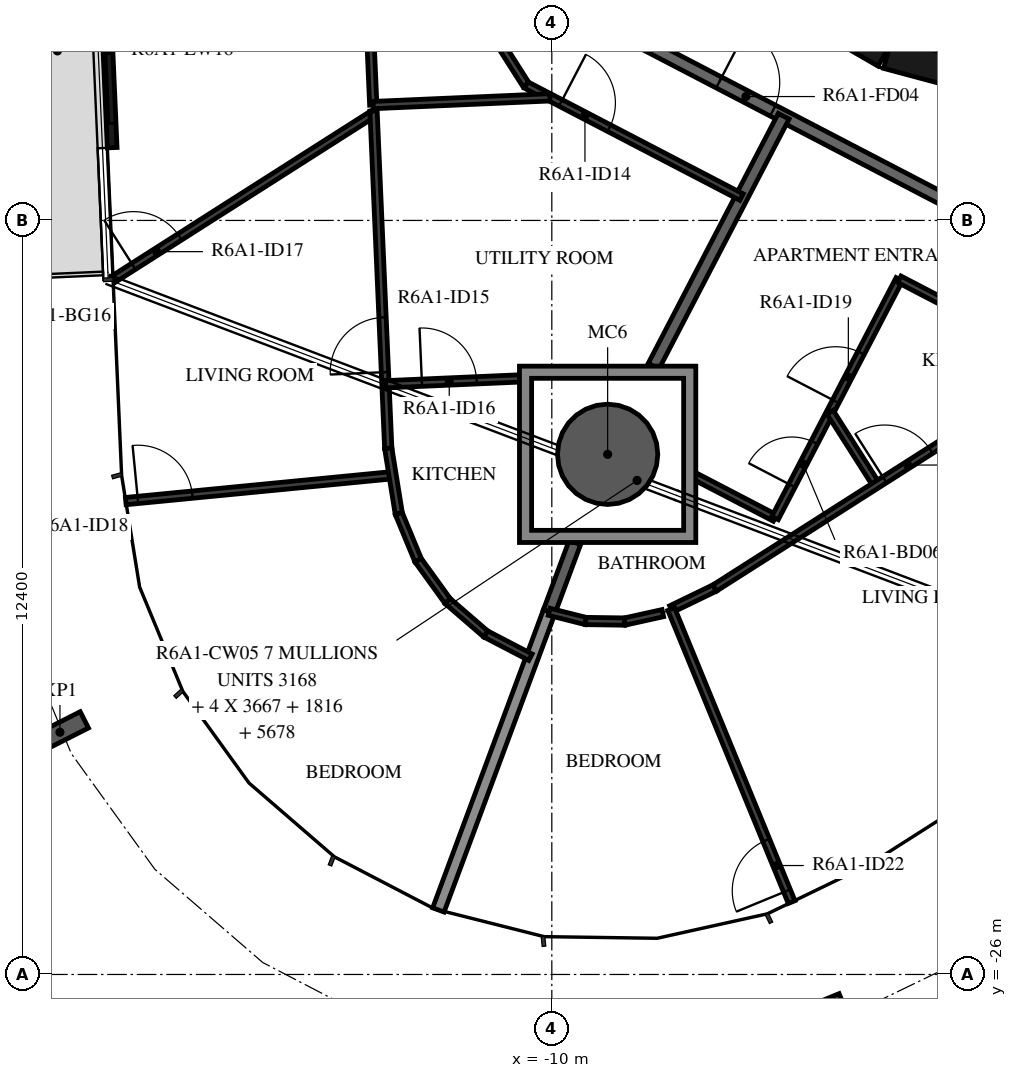
"""IFC4 building model, lengths in metres.
Left out: names, types, materials, properties, quantities, classifications, styles, units other than length and angle.
Written with IfcOpenShell. Run it as: python <this file> out.ifc"""

import sys

from ifc_helpers import new_model, si_unit, direction, frame, frame_2d, origin, origin_2d, place, context, subcontext, project, spatial, polyline, rectangle, hollow_circle, i_section, outline, extrude, element, fill, save


model = new_model("IFC4")
c1 = context("Model", 3, precision=1e-05, world=origin(), true_north=direction((0.0, 1.0)))
c2 = subcontext(c1, "Body", "Model", "MODEL_VIEW")
j1 = project(units=[si_unit("LENGTHUNIT", "METRE"), si_unit("PLANEANGLEUNIT", "RADIAN")], contexts=[c1])
p1 = place(None, origin())
s1 = spatial("IfcSite", under=j1, at=p1, CompositionType="ELEMENT")
p2 = place(p1, origin())
s2 = spatial("IfcBuilding", under=s1, at=p2, CompositionType="ELEMENT")
p3 = place(p2, frame((0.0, 0.0, 230.2)))
s3 = spatial("IfcBuildingStorey", under=s2, at=p3, CompositionType="ELEMENT", Elevation=230.2)
p4 = place(p3, frame((-9.082, -17.446, -0.38), z_axis=(0.0, 0.0, 1.0), x_axis=(1.0, 0.0, 0.0)))
e1 = element("IfcColumn", 1, at=p4, inside=s3, PredefinedType="COLUMN", context=c2, shape_type="SweptSolid", body=[
    extrude(hollow_circle(Radius=0.825, WallThickness=0.04, at=origin_2d()), origin(), (0.0, 0.0, 1.0), 3.5),
])
for number, where, z_axis, x_axis in (
    (2, (-18.089, -22.016, -0.38), (0.0, 0.0, 1.0), (-0.452, 0.892, 0.0)),
    (3, (-5.243, -26.789, -0.38), (0.0, 0.0, 1.0), (-0.925, -0.38, 0.0)),
):
    element("IfcColumn", number, at=place(p3, frame(where, z_axis=z_axis, x_axis=x_axis)), inside=s3, PredefinedType="COLUMN", context=c2, shape_type="SweptSolid", body=[
        extrude(i_section(OverallWidth=0.3, OverallDepth=0.9, WebThickness=0.019, FlangeThickness=0.035, FilletRadius=0.03, at=origin_2d()), origin(), (0.0, 0.0, 1.0), 3.5),
    ])
p5 = place(p3, frame((-17.369, -9.207, 0.0), z_axis=(0.0, 0.0, 1.0), x_axis=(0.043639181999, -0.999047357133, 0.0)))
e4 = element("IfcWall", 4, at=p5, inside=s3, PredefinedType="STANDARD", context=c2, shape_type="SweptSolid", body=[
    extrude(rectangle(XDim=3.2, YDim=0.16, at=frame_2d((1.6, 0.0))), origin(), (0.0, 0.0, 1.0), 3.12),
])
p6 = place(p5, frame((0.4, 0.0, 0.0)))
e5 = element("IfcOpeningElement", 5, at=p6, cuts=e4, PredefinedType="OPENING", context=c2, shape_type="SweptSolid", body=[
    extrude(rectangle(XDim=2.4, YDim=2.4, at=frame_2d((1.2, 1.2))), frame((0.0, 0.09, 0.0), z_axis=(0.0, -1.0, 0.0), x_axis=(1.0, 0.0, 0.0)), (0.0, 0.0, 1.0), 0.18),
])
for number, where, z_axis, x_axis in (
    (6, (-7.137, -9.329, 0.0), (0.0, 0.0, 1.0), (0.866, -0.5, 0.0)),
    (7, (-4.479, -10.858, 0.0), (0.0, 0.0, 1.0), (0.966, -0.259, 0.0)),
):
    element("IfcWall", number, at=place(p3, frame(where, z_axis=z_axis, x_axis=x_axis)), inside=s3, PredefinedType="SHEAR", context=c2, shape_type="SweptSolid", body=[
        extrude(rectangle(XDim=3.033, YDim=0.5, at=frame_2d((1.516, 0.0))), origin(), (0.0, 0.0, 1.0), 3.12),
    ])
p7 = place(p3, frame((-9.372, -10.228, 0.0), z_axis=(0.0, 0.0, 1.0), x_axis=(0.887005184532, -0.461759464021, 0.0)))
e8 = element("IfcWall", 8, at=p7, inside=s3, PredefinedType="STANDARD", context=c2, shape_type="SweptSolid", body=[
    extrude(rectangle(XDim=7.181, YDim=0.2, at=frame_2d((3.591, 0.0))), origin(), (0.0, 0.0, 1.0), 3.12),
])
p8 = place(p7, frame((2.391, 0.0, 0.0)))
e9 = element("IfcOpeningElement", 9, at=p8, cuts=e8, PredefinedType="OPENING", context=c2, shape_type="SweptSolid", body=[
    extrude(rectangle(XDim=1.0, YDim=2.1, at=frame_2d((0.5, 1.05))), frame((0.0, 0.11, 0.0), z_axis=(0.0, -1.0, 0.0), x_axis=(1.0, 0.0, 0.0)), (0.0, 0.0, 1.0), 0.22),
])
p9 = place(p3, frame((-8.326, -15.996, 0.0), z_axis=(0.0, 0.0, 1.0), x_axis=(0.461739255077, 0.887015704664, 0.0)))
e10 = element("IfcWall", 10, at=p9, inside=s3, PredefinedType="STANDARD", context=c2, shape_type="SweptSolid", body=[
    extrude(rectangle(XDim=4.633, YDim=0.2, at=frame_2d((2.317, 0.0))), origin(), (0.0, 0.0, 1.0), 3.12),
])
p10 = place(p3, frame((-11.865, -24.939, 0.0), z_axis=(0.0, 0.0, 1.0), x_axis=(0.348236919929, 0.937406554062, 0.0)))
e11 = element("IfcWall", 11, at=p10, inside=s3, PredefinedType="STANDARD", context=c2, shape_type="SweptSolid", body=[
    extrude(rectangle(XDim=5.231, YDim=0.2, at=frame_2d((2.615, 0.0))), origin(), (0.0, 0.0, 1.0), 2.73),
])
p11 = place(p3, frame((-10.044, -20.036, 0.0), z_axis=(0.0, 0.0, 1.0), x_axis=(0.348282344491, 0.937389678051, 0.0)))
e12 = element("IfcWall", 12, at=p11, inside=s3, PredefinedType="STANDARD", context=c2, shape_type="SweptSolid", body=[
    extrude(rectangle(XDim=1.216, YDim=0.2, at=frame_2d((0.608, 0.0))), origin(), (0.0, 0.0, 1.0), 3.12),
])
p12 = place(p3, frame((-13.137, -7.111, 0.0), z_axis=(0.0, 0.0, 1.0), x_axis=(0.537300549444, -0.843390846267, 0.0)))
e13 = element("IfcWall", 13, at=p12, inside=s3, PredefinedType="PARTITIONING", context=c2, shape_type="SweptSolid", body=[
    extrude(rectangle(XDim=5.054, YDim=0.12, at=frame_2d((2.527, 0.0))), origin(), (0.0, 0.0, 1.0), 3.12),
])
p13 = place(p12, frame((1.5, 0.0, 0.0)))
e14 = element("IfcOpeningElement", 14, at=p13, cuts=e13, PredefinedType="OPENING", context=c2, shape_type="SweptSolid", body=[
    extrude(rectangle(XDim=0.8, YDim=2.1, at=frame_2d((0.4, 1.05))), frame((0.0, 0.07, 0.0), z_axis=(0.0, -1.0, 0.0), x_axis=(1.0, 0.0, 0.0)), (0.0, 0.0, 1.0), 0.14),
])
p14 = place(p3, frame((-10.421, -11.373, 0.0), z_axis=(0.0, 0.0, 1.0), x_axis=(0.887006451745, -0.461757029792, 0.0)))
e15 = element("IfcWall", 15, at=p14, inside=s3, PredefinedType="PARTITIONING", context=c2, shape_type="SweptSolid", body=[
    extrude(rectangle(XDim=3.992, YDim=0.12, at=frame_2d((1.996, 0.0))), origin(), (0.0, 0.0, 1.0), 3.12),
])
p15 = place(p14, frame((0.639, 0.0, 0.0)))
e16 = element("IfcOpeningElement", 16, at=p15, cuts=e15, PredefinedType="OPENING", context=c2, shape_type="SweptSolid", body=[
    extrude(rectangle(XDim=0.9, YDim=2.1, at=frame_2d((0.45, 1.05))), frame((0.0, 0.07, 0.0), z_axis=(0.0, -1.0, 0.0), x_axis=(1.0, 0.0, 0.0)), (0.0, 0.0, 1.0), 0.14),
])
p16 = place(p3, frame((-12.936, -11.703, 0.0), z_axis=(0.0, 0.0, 1.0), x_axis=(-0.043610108597, 0.999048626658, 0.0)))
e17 = element("IfcWall", 17, at=p16, inside=s3, PredefinedType="PARTITIONING", context=c2, shape_type="SweptSolid", body=[
    extrude(rectangle(XDim=4.596, YDim=0.12, at=frame_2d((2.298, 0.0))), origin(), (0.0, 0.0, 1.0), 3.12),
])
p17 = place(p3, frame((-17.215, -14.57, 0.0), z_axis=(0.0, 0.0, 1.0), x_axis=(0.843396239681, 0.537292083407, 0.0)))
e18 = element("IfcWall", 18, at=p17, inside=s3, PredefinedType="PARTITIONING", context=c2, shape_type="SweptSolid", body=[
    extrude(rectangle(XDim=5.081, YDim=0.12, at=frame_2d((2.54, 0.0))), origin(), (0.0, 0.0, 1.0), 3.12),
])
p18 = place(p17, frame((0.4, 0.0, 0.0)))
e19 = element("IfcOpeningElement", 19, at=p18, cuts=e18, PredefinedType="OPENING", context=c2, shape_type="SweptSolid", body=[
    extrude(rectangle(XDim=0.9, YDim=2.1, at=frame_2d((0.45, 1.05))), frame((0.0, 0.07, 0.0), z_axis=(0.0, -1.0, 0.0), x_axis=(1.0, 0.0, 0.0)), (0.0, 0.0, 1.0), 0.14),
])
p19 = place(p3, frame((-12.936, -11.703, 0.0), z_axis=(0.0, 0.0, 1.0), x_axis=(0.999046310188, 0.043663143495, 0.0)))
e20 = element("IfcWall", 20, at=p19, inside=s3, PredefinedType="PARTITIONING", context=c2, shape_type="SweptSolid", body=[
    extrude(rectangle(XDim=2.907, YDim=0.12, at=frame_2d((1.454, 0.0))), origin(), (0.0, 0.0, 1.0), 3.12),
])
p20 = place(p3, frame((-12.69, -17.347, 0.0), z_axis=(0.0, 0.0, 1.0), x_axis=(-0.043618497177, 0.999048260448, 0.0)))
e21 = element("IfcWall", 21, at=p20, inside=s3, PredefinedType="PARTITIONING", context=c2, shape_type="SweptSolid", body=[
    extrude(rectangle(XDim=5.552, YDim=0.12, at=frame_2d((2.776, 0.0))), origin(), (0.0, 0.0, 1.0), 3.12),
])
p21 = place(p20, frame((1.254, 0.0, 0.0)))
e22 = element("IfcOpeningElement", 22, at=p21, cuts=e21, PredefinedType="OPENING", context=c2, shape_type="SweptSolid", body=[
    extrude(rectangle(XDim=0.9, YDim=2.1, at=frame_2d((0.45, 1.05))), frame((0.0, 0.07, 0.0), z_axis=(0.0, -1.0, 0.0), x_axis=(1.0, 0.0, 0.0)), (0.0, 0.0, 1.0), 0.14),
])
p22 = place(p3, frame((-17.007, -18.216, 0.0), z_axis=(0.0, 0.0, 1.0), x_axis=(0.995320337688, 0.09663035436, 0.0)))
e23 = element("IfcWall", 23, at=p22, inside=s3, PredefinedType="PARTITIONING", context=c2, shape_type="SweptSolid", body=[
    extrude(rectangle(XDim=4.409, YDim=0.12, at=frame_2d((2.205, 0.0))), origin(), (0.0, 0.0, 1.0), 3.12),
])
p23 = place(p22, frame((0.2, 0.0, 0.0)))
e24 = element("IfcOpeningElement", 24, at=p23, cuts=e23, PredefinedType="OPENING", context=c2, shape_type="SweptSolid", body=[
    extrude(rectangle(XDim=0.9, YDim=2.1, at=frame_2d((0.45, 1.05))), frame((0.0, 0.07, 0.0), z_axis=(0.0, -1.0, 0.0), x_axis=(1.0, 0.0, 0.0)), (0.0, 0.0, 1.0), 0.14),
])
p24 = place(p3, frame((-12.517, -18.42, 0.0), z_axis=(0.0, 0.0, 1.0), x_axis=(-0.159260688022, 0.987236563976, 0.0)))
e25 = element("IfcWall", 25, at=p24, inside=s3, PredefinedType="PARTITIONING", context=c2, shape_type="SweptSolid", body=[
    extrude(rectangle(XDim=1.087, YDim=0.12, at=frame_2d((0.543, 0.0))), origin(), (0.0, 0.0, 1.0), 3.12),
])
p25 = place(p3, frame((-12.736, -16.295, 0.0), z_axis=(0.0, 0.0, 1.0), x_axis=(0.999043796611, 0.043720618177, 0.0)))
e26 = element("IfcWall", 26, at=p25, inside=s3, PredefinedType="PARTITIONING", context=c2, shape_type="SweptSolid", body=[
    extrude(rectangle(XDim=2.206, YDim=0.12, at=frame_2d((1.103, 0.0))), origin(), (0.0, 0.0, 1.0), 3.12),
])
p26 = place(p25, frame((0.6, 0.0, 0.0)))
e27 = element("IfcOpeningElement", 27, at=p26, cuts=e26, PredefinedType="OPENING", context=c2, shape_type="SweptSolid", body=[
    extrude(rectangle(XDim=0.9, YDim=2.1, at=frame_2d((0.45, 1.05))), frame((0.0, 0.07, 0.0), z_axis=(0.0, -1.0, 0.0), x_axis=(1.0, 0.0, 0.0)), (0.0, 0.0, 1.0), 0.14),
])
for number, where, z_axis, x_axis in (
    (28, (-10.352, -20.783, 0.0), (0.0, 0.0, 1.0), (-0.887, 0.462, 0.0)),
    (29, (-11.087, -20.4, 0.0), (0.0, 0.0, 1.0), (-0.757, 0.654, 0.0)),
):
    element("IfcWall", number, at=place(p3, frame(where, z_axis=z_axis, x_axis=x_axis)), inside=s3, PredefinedType="PARTITIONING", context=c2, shape_type="SweptSolid", body=[
        extrude(rectangle(XDim=0.829, YDim=0.12, at=frame_2d((0.415, 0.0))), origin(), (0.0, 0.0, 1.0), 3.12),
    ])
p27 = place(p3, frame((-11.714, -19.858, 0.0), z_axis=(0.0, 0.0, 1.0), x_axis=(-0.585436792562, 0.810718053281, 0.0)))
e30 = element("IfcWall", 30, at=p27, inside=s3, PredefinedType="PARTITIONING", context=c2, shape_type="SweptSolid", body=[
    extrude(rectangle(XDim=0.829, YDim=0.12, at=frame_2d((0.415, 0.0))), origin(), (0.0, 0.0, 1.0), 3.12),
])
p28 = place(p3, frame((-12.199, -19.186, 0.0), z_axis=(0.0, 0.0, 1.0), x_axis=(-0.382585904135, 0.923919923996, 0.0)))
e31 = element("IfcWall", 31, at=p28, inside=s3, PredefinedType="PARTITIONING", context=c2, shape_type="SweptSolid", body=[
    extrude(rectangle(XDim=0.829, YDim=0.12, at=frame_2d((0.415, 0.0))), origin(), (0.0, 0.0, 1.0), 3.12),
])
p29 = place(p3, frame((-7.632, -17.815, 0.0), z_axis=(0.0, 0.0, 1.0), x_axis=(0.886960889958, -0.461844540602, 0.0)))
e32 = element("IfcWall", 32, at=p29, inside=s3, PredefinedType="PARTITIONING", context=c2, shape_type="SweptSolid", body=[
    extrude(rectangle(XDim=1.469, YDim=0.12, at=frame_2d((0.734, 0.0))), origin(), (0.0, 0.0, 1.0), 3.12),
])
p30 = place(p3, frame((-6.329, -18.494, 0.0), z_axis=(0.0, 0.0, 1.0), x_axis=(0.461759058182, 0.887005395805, 0.0)))
e33 = element("IfcWall", 33, at=p30, inside=s3, PredefinedType="PARTITIONING", context=c2, shape_type="SweptSolid", body=[
    extrude(rectangle(XDim=4.427, YDim=0.12, at=frame_2d((2.213, 0.0))), origin(), (0.0, 0.0, 1.0), 3.12),
])
p31 = place(p30, frame((0.6, 0.0, 0.0)))
e34 = element("IfcOpeningElement", 34, at=p31, cuts=e33, PredefinedType="OPENING", context=c2, shape_type="SweptSolid", body=[
    extrude(rectangle(XDim=0.8, YDim=2.1, at=frame_2d((0.4, 1.05))), frame((0.0, 0.07, 0.0), z_axis=(0.0, -1.0, 0.0), x_axis=(1.0, 0.0, 0.0)), (0.0, 0.0, 1.0), 0.14),
])
p32 = place(p30, frame((2.161, 0.0, 0.0)))
e35 = element("IfcOpeningElement", 35, at=p32, cuts=e33, PredefinedType="OPENING", context=c2, shape_type="SweptSolid", body=[
    extrude(rectangle(XDim=0.9, YDim=2.1, at=frame_2d((0.45, 1.05))), frame((0.0, 0.07, 0.0), z_axis=(0.0, -1.0, 0.0), x_axis=(1.0, 0.0, 0.0)), (0.0, 0.0, 1.0), 0.14),
])
p33 = place(p3, frame((-4.285, -14.567, 0.0), z_axis=(0.0, 0.0, 1.0), x_axis=(0.887033177378, -0.46170568789, 0.0)))
e36 = element("IfcWall", 36, at=p33, inside=s3, PredefinedType="PARTITIONING", context=c2, shape_type="SweptSolid", body=[
    extrude(rectangle(XDim=1.067, YDim=0.12, at=frame_2d((0.534, 0.0))), origin(), (0.0, 0.0, 1.0), 3.12),
])
p34 = place(p3, frame((-10.044, -20.036, 0.0), z_axis=(0.0, 0.0, 1.0), x_axis=(0.969630684539, -0.24457378355, 0.0)))
e37 = element("IfcWall", 37, at=p34, inside=s3, PredefinedType="PARTITIONING", context=c2, shape_type="SweptSolid", body=[
    extrude(rectangle(XDim=0.62, YDim=0.12, at=frame_2d((0.31, 0.0))), origin(), (0.0, 0.0, 1.0), 3.12),
])
for number, where, z_axis, x_axis in (
    (38, (-9.443, -20.187, 0.0), (0.0, 0.0, 1.0), (1.0, -0.014, 0.0)),
    (39, (-8.801, -20.197, 0.0), (0.0, 0.0, 1.0), (0.976, 0.216, 0.0)),
):
    element("IfcWall", number, at=place(p3, frame(where, z_axis=z_axis, x_axis=x_axis)), inside=s3, PredefinedType="PARTITIONING", context=c2, shape_type="SweptSolid", body=[
        extrude(rectangle(XDim=0.642, YDim=0.12, at=frame_2d((0.321, 0.0))), origin(), (0.0, 0.0, 1.0), 3.12),
    ])
p35 = place(p3, frame((-4.662, -17.95, 0.0), z_axis=(0.0, 0.0, 1.0), x_axis=(-0.537254271207, 0.843420327043, 0.0)))
e40 = element("IfcWall", 40, at=p35, inside=s3, PredefinedType="PARTITIONING", context=c2, shape_type="SweptSolid", body=[
    extrude(rectangle(XDim=1.418, YDim=0.12, at=frame_2d((0.709, 0.0))), origin(), (0.0, 0.0, 1.0), 3.12),
])
p36 = place(p3, frame((-8.037, -19.991, 0.0), z_axis=(0.0, 0.0, 1.0), x_axis=(0.900073671326, 0.435737749323, 0.0)))
e41 = element("IfcWall", 41, at=p36, inside=s3, PredefinedType="PARTITIONING", context=c2, shape_type="SweptSolid", body=[
    extrude(rectangle(XDim=0.794, YDim=0.12, at=frame_2d((0.397, 0.0))), origin(), (0.0, 0.0, 1.0), 3.12),
])
p37 = place(p3, frame((-7.322, -19.645, 0.0), z_axis=(0.0, 0.0, 1.0), x_axis=(0.843385361817, 0.537309158188, 0.0)))
e42 = element("IfcWall", 42, at=p37, inside=s3, PredefinedType="PARTITIONING", context=c2, shape_type="SweptSolid", body=[
    extrude(rectangle(XDim=8.814, YDim=0.12, at=frame_2d((4.407, 0.0))), origin(), (0.0, 0.0, 1.0), 3.12),
])
p38 = place(p37, frame((3.314, 0.0, 0.0)))
e43 = element("IfcOpeningElement", 43, at=p38, cuts=e42, PredefinedType="OPENING", context=c2, shape_type="SweptSolid", body=[
    extrude(rectangle(XDim=0.9, YDim=2.1, at=frame_2d((0.45, 1.05))), frame((0.0, 0.07, 0.0), z_axis=(0.0, -1.0, 0.0), x_axis=(1.0, 0.0, 0.0)), (0.0, 0.0, 1.0), 0.14),
])
p39 = place(p3, frame((-6.057, -24.81, 0.0), z_axis=(0.0, 0.0, 1.0), x_axis=(-0.380052033163, 0.924965108579, 0.0)))
e44 = element("IfcWall", 44, at=p39, inside=s3, PredefinedType="PARTITIONING", context=c2, shape_type="SweptSolid", body=[
    extrude(rectangle(XDim=5.21, YDim=0.12, at=frame_2d((2.605, 0.0))), origin(), (0.0, 0.0, 1.0), 3.12),
])
p40 = place(p39, frame((0.2, 0.0, 0.0)))
e45 = element("IfcOpeningElement", 45, at=p40, cuts=e44, PredefinedType="OPENING", context=c2, shape_type="SweptSolid", body=[
    extrude(rectangle(XDim=0.9, YDim=2.1, at=frame_2d((0.45, 1.05))), frame((0.0, 0.07, 0.0), z_axis=(0.0, -1.0, 0.0), x_axis=(1.0, 0.0, 0.0)), (0.0, 0.0, 1.0), 0.14),
])
p41 = place(p3, origin())
e46 = element("IfcWall", 46, at=p41, inside=s3, PredefinedType="STANDARD", context=c2, shape_type="SweptSolid", body=[
    extrude(outline(polyline([(-7.632, -15.996), (-7.632, -18.896), (-10.532, -18.896), (-10.532, -15.996), (-7.632, -15.996)]), holes=[polyline([(-10.332, -18.696), (-7.832, -18.696), (-7.832, -16.196), (-10.332, -16.196), (-10.332, -18.696)])]), origin(), (0.0, 0.0, 1.0), 3.12),
])
p42 = place(p6, origin())
e47 = element("IfcDoor", 47, at=p42, inside=s3, OperationType="DOUBLE_DOOR_SLIDING", PredefinedType="DOOR", context=c2, shape_type="SweptSolid", body=[
    extrude(rectangle(XDim=2.4, YDim=2.4, at=frame_2d((1.2, 1.2))), frame((0.0, 0.025, 0.0), z_axis=(0.0, -1.0, 0.0), x_axis=(1.0, 0.0, 0.0)), (0.0, 0.0, 1.0), 0.05),
])
fill(e5, e47)
p43 = place(p8, origin())
e48 = element("IfcDoor", 48, at=p43, inside=s3, OperationType="SINGLE_SWING_RIGHT", PredefinedType="DOOR", context=c2, shape_type="SweptSolid", body=[
    extrude(rectangle(XDim=1.0, YDim=2.1, at=frame_2d((0.5, 1.05))), frame((0.0, 0.025, 0.0), z_axis=(0.0, -1.0, 0.0), x_axis=(1.0, 0.0, 0.0)), (0.0, 0.0, 1.0), 0.05),
])
fill(e9, e48)
p44 = place(p15, origin())
e49 = element("IfcDoor", 49, at=p44, inside=s3, OperationType="SINGLE_SWING_RIGHT", PredefinedType="DOOR", context=c2, shape_type="SweptSolid", body=[
    extrude(rectangle(XDim=0.9, YDim=2.1, at=frame_2d((0.45, 1.05))), frame((0.0, 0.025, 0.0), z_axis=(0.0, -1.0, 0.0), x_axis=(1.0, 0.0, 0.0)), (0.0, 0.0, 1.0), 0.05),
])
fill(e16, e49)
p45 = place(p21, origin())
e50 = element("IfcDoor", 50, at=p45, inside=s3, OperationType="SINGLE_SWING_RIGHT", PredefinedType="DOOR", context=c2, shape_type="SweptSolid", body=[
    extrude(rectangle(XDim=0.9, YDim=2.1, at=frame_2d((0.45, 1.05))), frame((0.0, 0.025, 0.0), z_axis=(0.0, -1.0, 0.0), x_axis=(1.0, 0.0, 0.0)), (0.0, 0.0, 1.0), 0.05),
])
fill(e22, e50)
p46 = place(p26, origin())
e51 = element("IfcDoor", 51, at=p46, inside=s3, OperationType="SINGLE_SWING_RIGHT", PredefinedType="DOOR", context=c2, shape_type="SweptSolid", body=[
    extrude(rectangle(XDim=0.9, YDim=2.1, at=frame_2d((0.45, 1.05))), frame((0.0, 0.025, 0.0), z_axis=(0.0, -1.0, 0.0), x_axis=(1.0, 0.0, 0.0)), (0.0, 0.0, 1.0), 0.05),
])
fill(e27, e51)
p47 = place(p18, origin())
e52 = element("IfcDoor", 52, at=p47, inside=s3, OperationType="SINGLE_SWING_LEFT", PredefinedType="DOOR", context=c2, shape_type="SweptSolid", body=[
    extrude(rectangle(XDim=0.9, YDim=2.1, at=frame_2d((0.45, 1.05))), frame((0.0, 0.025, 0.0), z_axis=(0.0, -1.0, 0.0), x_axis=(1.0, 0.0, 0.0)), (0.0, 0.0, 1.0), 0.05),
])
fill(e19, e52)
p48 = place(p23, origin())
e53 = element("IfcDoor", 53, at=p48, inside=s3, OperationType="SINGLE_SWING_RIGHT", PredefinedType="DOOR", context=c2, shape_type="SweptSolid", body=[
    extrude(rectangle(XDim=0.9, YDim=2.1, at=frame_2d((0.45, 1.05))), frame((0.0, 0.025, 0.0), z_axis=(0.0, -1.0, 0.0), x_axis=(1.0, 0.0, 0.0)), (0.0, 0.0, 1.0), 0.05),
])
fill(e24, e53)
p49 = place(p31, origin())
e54 = element("IfcDoor", 54, at=p49, inside=s3, OperationType="SINGLE_SWING_LEFT", PredefinedType="DOOR", context=c2, shape_type="SweptSolid", body=[
    extrude(rectangle(XDim=0.8, YDim=2.1, at=frame_2d((0.4, 1.05))), frame((0.0, 0.025, 0.0), z_axis=(0.0, -1.0, 0.0), x_axis=(1.0, 0.0, 0.0)), (0.0, 0.0, 1.0), 0.05),
])
fill(e34, e54)
p50 = place(p32, origin())
e55 = element("IfcDoor", 55, at=p50, inside=s3, OperationType="SINGLE_SWING_LEFT", PredefinedType="DOOR", context=c2, shape_type="SweptSolid", body=[
    extrude(rectangle(XDim=0.9, YDim=2.1, at=frame_2d((0.45, 1.05))), frame((0.0, 0.025, 0.0), z_axis=(0.0, -1.0, 0.0), x_axis=(1.0, 0.0, 0.0)), (0.0, 0.0, 1.0), 0.05),
])
fill(e35, e55)
p51 = place(p38, origin())
e56 = element("IfcDoor", 56, at=p51, inside=s3, OperationType="SINGLE_SWING_LEFT", PredefinedType="DOOR", context=c2, shape_type="SweptSolid", body=[
    extrude(rectangle(XDim=0.9, YDim=2.1, at=frame_2d((0.45, 1.05))), frame((0.0, 0.025, 0.0), z_axis=(0.0, -1.0, 0.0), x_axis=(1.0, 0.0, 0.0)), (0.0, 0.0, 1.0), 0.05),
])
fill(e43, e56)
p52 = place(p40, origin())
e57 = element("IfcDoor", 57, at=p52, inside=s3, OperationType="SINGLE_SWING_LEFT", PredefinedType="DOOR", context=c2, shape_type="SweptSolid", body=[
    extrude(rectangle(XDim=0.9, YDim=2.1, at=frame_2d((0.45, 1.05))), frame((0.0, 0.025, 0.0), z_axis=(0.0, -1.0, 0.0), x_axis=(1.0, 0.0, 0.0)), (0.0, 0.0, 1.0), 0.05),
])
fill(e45, e57)
save(model, sys.argv[1])
